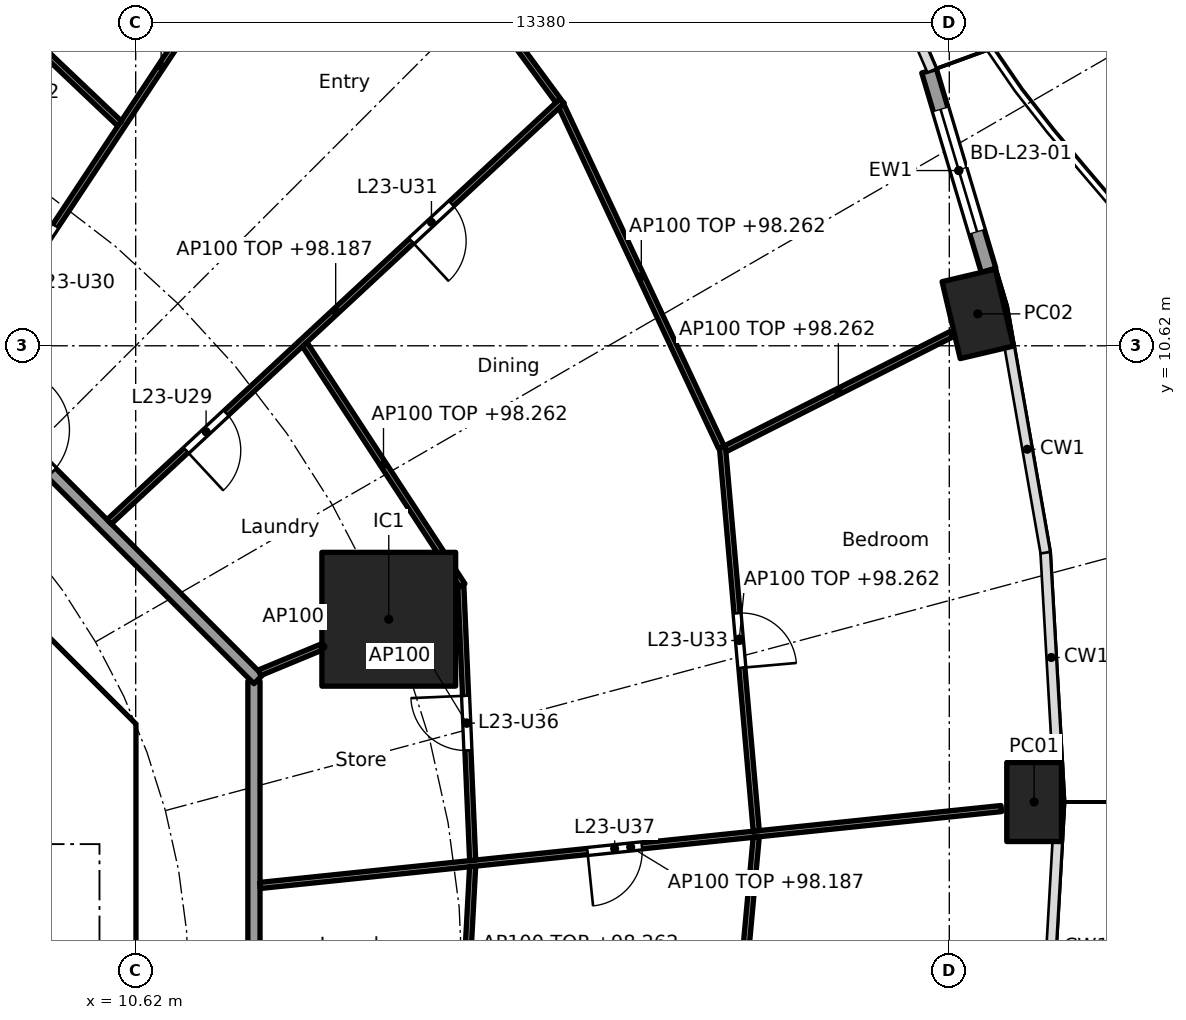
"""IFC4 building model, lengths in metres.
Left out: names, types, materials, properties, quantities, classifications, styles, units other than length and angle.
Written with IfcOpenShell. Run it as: python <this file> out.ifc"""

import sys

from ifc_helpers import new_model, si_unit, direction, frame, frame_2d, origin, origin_2d, place, context, subcontext, project, spatial, polyline, rectangle, hollow_rectangle, outline, extrude, element, fill, save


model = new_model("IFC4")
c1 = context("Model", 3, precision=1e-05, world=origin(), true_north=direction((0.0, 1.0)))
c2 = subcontext(c1, "Body", "Model", "MODEL_VIEW")
j1 = project(units=[si_unit("LENGTHUNIT", "METRE"), si_unit("PLANEANGLEUNIT", "RADIAN")], contexts=[c1])
p1 = place(None, origin())
s1 = spatial("IfcSite", under=j1, at=p1, CompositionType="ELEMENT")
p2 = place(p1, origin())
s2 = spatial("IfcBuilding", under=s1, at=p2, CompositionType="ELEMENT")
p3 = place(p2, frame((0.0, 0.0, 95.5)))
s3 = spatial("IfcBuildingStorey", under=s2, at=p3, CompositionType="ELEMENT", Elevation=95.5)
for number, where, z_axis, x_axis in (
    (1, (25.395, 3.118, 0.0), (0.0, 0.0, 1.0), (0.0, 1.0, 0.0)),
    (2, (24.468, 11.145, 0.0), (0.0, 0.0, 1.0), (-0.229, 0.973, 0.0)),
):
    element("IfcColumn", number, at=place(p3, frame(where, z_axis=z_axis, x_axis=x_axis)), inside=s3, PredefinedType="COLUMN", context=c2, shape_type="SweptSolid", body=[
        extrude(hollow_rectangle(XDim=1.3, YDim=0.9, WallThickness=0.045, at=origin_2d()), origin(), (0.0, 0.0, 1.0), 3.7),
    ])
p4 = place(p3, frame((14.782, 6.123, 0.0), z_axis=(0.0, 0.0, 1.0), x_axis=(1.0, 0.0, 0.0)))
e3 = element("IfcColumn", 3, at=p4, inside=s3, PredefinedType="COLUMN", context=c2, shape_type="SweptSolid", body=[
    extrude(rectangle(XDim=2.2, YDim=2.2, at=origin_2d()), origin(), (0.0, 0.0, 1.0), 3.7),
])
p5 = place(p3, frame((23.667, 15.142, 0.0), z_axis=(0.0, 0.0, 1.0), x_axis=(0.285882094477, -0.958264800594, 0.0)))
e4 = element("IfcWall", 4, at=p5, inside=s3, PredefinedType="SOLIDWALL", context=c2, shape_type="SweptSolid", body=[
    extrude(rectangle(XDim=3.424, YDim=0.25, at=frame_2d((1.712, 0.0))), origin(), (0.0, 0.0, 1.0), 3.44),
])
p6 = place(p5, frame((0.662, 0.0, 0.0)))
e5 = element("IfcOpeningElement", 5, at=p6, cuts=e4, PredefinedType="OPENING", context=c2, shape_type="SweptSolid", body=[
    extrude(rectangle(XDim=2.1, YDim=2.4, at=frame_2d((1.05, 1.2))), frame((0.0, 0.135, 0.0), z_axis=(0.0, -1.0, 0.0), x_axis=(1.0, 0.0, 0.0)), (0.0, 0.0, 1.0), 0.27),
])
p7 = place(p3, frame((9.988, 4.613, 0.0), z_axis=(0.0, 0.0, 1.0), x_axis=(-0.707106781187, 0.707106781187, 0.0)))
e6 = element("IfcWall", 6, at=p7, inside=s3, PredefinedType="SHEAR", context=c2, shape_type="SweptSolid", body=[
    extrude(rectangle(XDim=7.602, YDim=0.6, at=frame_2d((3.801, 0.0))), origin(), (0.0, 0.0, 1.0), 3.44),
])
p8 = place(p7, frame((3.201, 0.0, 0.0)))
e7 = element("IfcOpeningElement", 7, at=p8, cuts=e6, PredefinedType="OPENING", context=c2, shape_type="SweptSolid", body=[
    extrude(rectangle(XDim=1.2, YDim=2.1, at=frame_2d((0.6, 1.05))), frame((0.0, 0.31, 0.0), z_axis=(0.0, -1.0, 0.0), x_axis=(1.0, 0.0, 0.0)), (0.0, 0.0, 1.0), 0.62),
])
p9 = place(p3, frame((6.7, 4.0, 0.0), z_axis=(0.0, 0.0, 1.0), x_axis=(1.0, 0.0, 0.0)))
e8 = element("IfcWall", 8, at=p9, inside=s3, PredefinedType="SOLIDWALL", context=c2, shape_type="SweptSolid", body=[
    extrude(rectangle(XDim=3.325, YDim=0.2, at=frame_2d((1.662, 0.0))), origin(), (0.0, 0.0, 1.0), 3.44),
])
p10 = place(p9, frame((1.25, 0.0, 0.0)))
e9 = element("IfcOpeningElement", 9, at=p10, cuts=e8, PredefinedType="OPENING", context=c2, shape_type="SweptSolid", body=[
    extrude(rectangle(XDim=1.1, YDim=2.1, at=frame_2d((0.55, 1.05))), frame((0.0, 0.11, 0.0), z_axis=(0.0, -1.0, 0.0), x_axis=(1.0, 0.0, 0.0)), (0.0, 0.0, 1.0), 0.22),
])
p11 = place(p3, origin())
e10 = element("IfcWall", 10, at=p11, inside=s3, PredefinedType="SHEAR", context=c2, shape_type="SweptSolid", body=[
    extrude(outline(polyline([(9.776, -4.401), (10.025, -4.152), (10.025, -3.801), (10.025, 4.152), (9.776, 4.401), (10.2, 4.825), (10.625, 4.401), (10.625, -4.401), (10.2, -4.825), (9.776, -4.401)])), origin(), (0.0, 0.0, 1.0), 3.44),
])
p12 = place(p3, frame((6.141, 14.829, 0.0), z_axis=(0.0, 0.0, 1.0), x_axis=(0.354477134193, 0.935064682968, 0.0)))
e11 = element("IfcWall", 11, at=p12, inside=s3, PredefinedType="PARTITIONING", context=c2, shape_type="SweptSolid", body=[
    extrude(rectangle(XDim=15.626, YDim=0.2, at=frame_2d((7.813, 0.0))), origin(), (0.0, 0.0, 1.0), 2.762),
])
p13 = place(p3, frame((12.565, -5.104, 0.0), z_axis=(0.0, 0.0, 1.0), x_axis=(0.0, 1.0, 0.0)))
e12 = element("IfcWall", 12, at=p13, inside=s3, PredefinedType="PARTITIONING", context=c2, shape_type="SweptSolid", body=[
    extrude(rectangle(XDim=10.209, YDim=0.2, at=frame_2d((5.104, 0.0))), origin(), (0.0, 0.0, 1.0), 3.44),
])
p14 = place(p3, frame((12.635, 5.134, 0.0), z_axis=(0.0, 0.0, 1.0), x_axis=(-0.707106781187, 0.707106781187, 0.0)))
e13 = element("IfcWall", 13, at=p14, inside=s3, PredefinedType="PARTITIONING", context=c2, shape_type="SweptSolid", body=[
    extrude(rectangle(XDim=10.609, YDim=0.2, at=frame_2d((5.305, 0.0))), origin(), (0.0, 0.0, 1.0), 3.44),
])
p15 = place(p14, frame((4.804, 0.0, 0.0)))
e14 = element("IfcOpeningElement", 14, at=p15, cuts=e13, PredefinedType="OPENING", context=c2, shape_type="SweptSolid", body=[
    extrude(rectangle(XDim=1.0, YDim=2.1, at=frame_2d((0.5, 1.05))), frame((0.0, 0.11, 0.0), z_axis=(0.0, -1.0, 0.0), x_axis=(1.0, 0.0, 0.0)), (0.0, 0.0, 1.0), 0.22),
])
p16 = place(p3, frame((12.664, 1.745, 0.0), z_axis=(0.0, 0.0, 1.0), x_axis=(0.994662790212, 0.103179134358, 0.0)))
e15 = element("IfcWall", 15, at=p16, inside=s3, PredefinedType="PARTITIONING", context=c2, shape_type="SweptSolid", body=[
    extrude(rectangle(XDim=12.257, YDim=0.1, at=frame_2d((6.128, 0.0))), origin(), (0.0, 0.0, 1.0), 2.687),
])
p17 = place(p16, frame((5.414, 0.0, 0.0)))
e16 = element("IfcOpeningElement", 16, at=p17, cuts=e15, PredefinedType="OPENING", context=c2, shape_type="SweptSolid", body=[
    extrude(rectangle(XDim=0.9, YDim=2.1, at=frame_2d((0.45, 1.05))), frame((0.0, 0.06, 0.0), z_axis=(0.0, -1.0, 0.0), x_axis=(1.0, 0.0, 0.0)), (0.0, 0.0, 1.0), 0.12),
])
p18 = place(p3, frame((16.162, 2.158, 0.0), z_axis=(0.0, 0.0, 1.0), x_axis=(-0.043120653248, 0.999069872063, 0.0)))
e17 = element("IfcWall", 17, at=p18, inside=s3, PredefinedType="PARTITIONING", context=c2, shape_type="SweptSolid", body=[
    extrude(rectangle(XDim=4.518, YDim=0.1, at=frame_2d((2.259, 0.0))), origin(), (0.0, 0.0, 1.0), 3.44),
])
p19 = place(p18, frame((1.809, 0.0, 0.0)))
e18 = element("IfcOpeningElement", 18, at=p19, cuts=e17, PredefinedType="OPENING", context=c2, shape_type="SweptSolid", body=[
    extrude(rectangle(XDim=0.9, YDim=2.1, at=frame_2d((0.45, 1.05))), frame((0.0, 0.06, 0.0), z_axis=(0.0, -1.0, 0.0), x_axis=(1.0, 0.0, 0.0)), (0.0, 0.0, 1.0), 0.12),
])
p20 = place(p3, frame((16.161, 2.058, 0.0), z_axis=(0.0, 0.0, 1.0), x_axis=(-0.053696394729, -0.998557307916, 0.0)))
e19 = element("IfcWall", 19, at=p20, inside=s3, PredefinedType="PARTITIONING", context=c2, shape_type="SweptSolid", body=[
    extrude(rectangle(XDim=4.742, YDim=0.1, at=frame_2d((2.371, 0.0))), origin(), (0.0, 0.0, 1.0), 2.762),
])
p21 = place(p20, frame((1.896, 0.0, 0.0)))
e20 = element("IfcOpeningElement", 20, at=p21, cuts=e19, PredefinedType="OPENING", context=c2, shape_type="SweptSolid", body=[
    extrude(rectangle(XDim=0.9, YDim=2.1, at=frame_2d((0.45, 1.05))), frame((0.0, 0.06, 0.0), z_axis=(0.0, -1.0, 0.0), x_axis=(1.0, 0.0, 0.0)), (0.0, 0.0, 1.0), 0.12),
])
p22 = place(p3, frame((20.825, 2.642, 0.0), z_axis=(0.0, 0.0, 1.0), x_axis=(-0.08776338161, 0.996141349834, 0.0)))
e21 = element("IfcWall", 21, at=p22, inside=s3, PredefinedType="PARTITIONING", context=c2, shape_type="SweptSolid", body=[
    extrude(rectangle(XDim=6.337, YDim=0.1, at=frame_2d((3.168, 0.0))), origin(), (0.0, 0.0, 1.0), 2.762),
])
p23 = place(p22, frame((2.694, 0.0, 0.0)))
e22 = element("IfcOpeningElement", 22, at=p23, cuts=e21, PredefinedType="OPENING", context=c2, shape_type="SweptSolid", body=[
    extrude(rectangle(XDim=0.9, YDim=2.1, at=frame_2d((0.45, 1.05))), frame((0.0, 0.06, 0.0), z_axis=(0.0, -1.0, 0.0), x_axis=(1.0, 0.0, 0.0)), (0.0, 0.0, 1.0), 0.12),
])
p24 = place(p3, frame((20.825, 2.542, 0.0), z_axis=(0.0, 0.0, 1.0), x_axis=(-0.09140211812, -0.995814065377, 0.0)))
e23 = element("IfcWall", 23, at=p24, inside=s3, PredefinedType="PARTITIONING", context=c2, shape_type="SweptSolid", body=[
    extrude(rectangle(XDim=6.403, YDim=0.1, at=frame_2d((3.201, 0.0))), origin(), (0.0, 0.0, 1.0), 2.762),
])
p25 = place(p24, frame((2.726, 0.0, 0.0)))
e24 = element("IfcOpeningElement", 24, at=p25, cuts=e23, PredefinedType="OPENING", context=c2, shape_type="SweptSolid", body=[
    extrude(rectangle(XDim=0.9, YDim=2.1, at=frame_2d((0.45, 1.05))), frame((0.0, 0.06, 0.0), z_axis=(0.0, -1.0, 0.0), x_axis=(1.0, 0.0, 0.0)), (0.0, 0.0, 1.0), 0.12),
])
p26 = place(p3, frame((12.657, 5.243, 0.0), z_axis=(0.0, 0.0, 1.0), x_axis=(0.923864733477, 0.382719158442, 0.0)))
e25 = element("IfcWall", 25, at=p26, inside=s3, PredefinedType="PARTITIONING", context=c2, shape_type="SweptSolid", body=[
    extrude(rectangle(XDim=2.25, YDim=0.1, at=frame_2d((1.125, 0.0))), origin(), (0.0, 0.0, 1.0), 3.44),
])
p27 = place(p3, frame((15.992, 6.68, 0.0), z_axis=(0.0, 0.0, 1.0), x_axis=(-0.547472878942, 0.836823426311, 0.0)))
e26 = element("IfcWall", 26, at=p27, inside=s3, PredefinedType="PARTITIONING", context=c2, shape_type="SweptSolid", body=[
    extrude(rectangle(XDim=4.738, YDim=0.1, at=frame_2d((2.369, 0.0))), origin(), (0.0, 0.0, 1.0), 2.762),
])
p28 = place(p3, frame((20.318, 8.927, 0.0), z_axis=(0.0, 0.0, 1.0), x_axis=(0.892057836959, 0.451921249246, 0.0)))
e27 = element("IfcWall", 27, at=p28, inside=s3, PredefinedType="PARTITIONING", context=c2, shape_type="SweptSolid", body=[
    extrude(rectangle(XDim=4.164, YDim=0.1, at=frame_2d((2.082, 0.0))), origin(), (0.0, 0.0, 1.0), 2.762),
])
p29 = place(p3, frame((20.252, 8.95, 0.0), z_axis=(0.0, 0.0, 1.0), x_axis=(-0.424580052627, 0.90539040138, 0.0)))
e28 = element("IfcWall", 28, at=p29, inside=s3, PredefinedType="PARTITIONING", context=c2, shape_type="SweptSolid", body=[
    extrude(rectangle(XDim=6.204, YDim=0.1, at=frame_2d((3.102, 0.0))), origin(), (0.0, 0.0, 1.0), 2.762),
])
p30 = place(p3, frame((10.185, 7.726, 0.0), z_axis=(0.0, 0.0, 1.0), x_axis=(0.732598472978, 0.680661059112, 0.0)))
e29 = element("IfcWall", 29, at=p30, inside=s3, PredefinedType="PARTITIONING", context=c2, shape_type="SweptSolid", body=[
    extrude(rectangle(XDim=10.167, YDim=0.1, at=frame_2d((5.084, 0.0))), origin(), (0.0, 0.0, 1.0), 2.687),
])
p31 = place(p30, frame((1.725, 0.0, 0.0)))
e30 = element("IfcOpeningElement", 30, at=p31, cuts=e29, PredefinedType="OPENING", context=c2, shape_type="SweptSolid", body=[
    extrude(rectangle(XDim=0.9, YDim=2.1, at=frame_2d((0.45, 1.05))), frame((0.0, 0.06, 0.0), z_axis=(0.0, -1.0, 0.0), x_axis=(1.0, 0.0, 0.0)), (0.0, 0.0, 1.0), 0.12),
])
p32 = place(p30, frame((6.784, 0.0, 0.0)))
e31 = element("IfcOpeningElement", 31, at=p32, cuts=e29, PredefinedType="OPENING", context=c2, shape_type="SweptSolid", body=[
    extrude(rectangle(XDim=0.9, YDim=2.1, at=frame_2d((0.45, 1.05))), frame((0.0, 0.06, 0.0), z_axis=(0.0, -1.0, 0.0), x_axis=(1.0, 0.0, 0.0)), (0.0, 0.0, 1.0), 0.12),
])
p33 = place(p3, frame((17.567, 14.653, 0.0), z_axis=(0.0, 0.0, 1.0), x_axis=(-0.592391983588, 0.80564988536, 0.0)))
e32 = element("IfcWall", 32, at=p33, inside=s3, PredefinedType="PARTITIONING", context=c2, shape_type="SweptSolid", body=[
    extrude(rectangle(XDim=6.08, YDim=0.1, at=frame_2d((3.04, 0.0))), origin(), (0.0, 0.0, 1.0), 2.762),
])
p34 = place(p33, frame((2.59, 0.0, 0.0)))
e33 = element("IfcOpeningElement", 33, at=p34, cuts=e32, PredefinedType="OPENING", context=c2, shape_type="SweptSolid", body=[
    extrude(rectangle(XDim=0.9, YDim=2.1, at=frame_2d((0.45, 1.05))), frame((0.0, 0.06, 0.0), z_axis=(0.0, -1.0, 0.0), x_axis=(1.0, 0.0, 0.0)), (0.0, 0.0, 1.0), 0.12),
])
p35 = place(p3, frame((7.713, 10.195, 0.0), z_axis=(0.0, 0.0, 1.0), x_axis=(0.552111071171, 0.833770571015, 0.0)))
e34 = element("IfcWall", 34, at=p35, inside=s3, PredefinedType="PARTITIONING", context=c2, shape_type="SweptSolid", body=[
    extrude(rectangle(XDim=17.208, YDim=0.1, at=frame_2d((8.604, 0.0))), origin(), (0.0, 0.0, 1.0), 2.687),
])
p36 = place(p35, frame((1.976, 0.0, 0.0)))
e35 = element("IfcOpeningElement", 35, at=p36, cuts=e34, PredefinedType="OPENING", context=c2, shape_type="SweptSolid", body=[
    extrude(rectangle(XDim=0.9, YDim=2.1, at=frame_2d((0.45, 1.05))), frame((0.0, 0.06, 0.0), z_axis=(0.0, -1.0, 0.0), x_axis=(1.0, 0.0, 0.0)), (0.0, 0.0, 1.0), 0.12),
])
p37 = place(p35, frame((7.611, 0.0, 0.0)))
e36 = element("IfcOpeningElement", 36, at=p37, cuts=e34, PredefinedType="OPENING", context=c2, shape_type="SweptSolid", body=[
    extrude(rectangle(XDim=0.9, YDim=2.1, at=frame_2d((0.45, 1.05))), frame((0.0, 0.06, 0.0), z_axis=(0.0, -1.0, 0.0), x_axis=(1.0, 0.0, 0.0)), (0.0, 0.0, 1.0), 0.12),
])
p38 = place(p35, frame((13.79, 0.0, 0.0)))
e37 = element("IfcOpeningElement", 37, at=p38, cuts=e34, PredefinedType="OPENING", context=c2, shape_type="SweptSolid", body=[
    extrude(rectangle(XDim=0.9, YDim=2.1, at=frame_2d((0.45, 1.05))), frame((0.0, 0.06, 0.0), z_axis=(0.0, -1.0, 0.0), x_axis=(1.0, 0.0, 0.0)), (0.0, 0.0, 1.0), 0.12),
])
p39 = place(p3, frame((10.355, 14.274, 0.0), z_axis=(0.0, 0.0, 1.0), x_axis=(-0.725206433622, 0.688531501555, 0.0)))
e38 = element("IfcWall", 38, at=p39, inside=s3, PredefinedType="PARTITIONING", context=c2, shape_type="SweptSolid", body=[
    extrude(rectangle(XDim=4.387, YDim=0.1, at=frame_2d((2.193, 0.0))), origin(), (0.0, 0.0, 1.0), 2.762),
])
p40 = place(p6, origin())
e39 = element("IfcDoor", 39, at=p40, inside=s3, OperationType="SLIDING_TO_LEFT", PredefinedType="DOOR", context=c2, shape_type="SweptSolid", body=[
    extrude(rectangle(XDim=2.1, YDim=2.4, at=frame_2d((1.05, 1.2))), frame((0.0, 0.025, 0.0), z_axis=(0.0, -1.0, 0.0), x_axis=(1.0, 0.0, 0.0)), (0.0, 0.0, 1.0), 0.05),
])
fill(e5, e39)
p41 = place(p15, frame((1.0, 0.0, 0.0), x_axis=(-1.0, 0.0, 0.0)))
e40 = element("IfcDoor", 40, at=p41, inside=s3, OperationType="SINGLE_SWING_LEFT", PredefinedType="DOOR", context=c2, shape_type="SweptSolid", body=[
    extrude(rectangle(XDim=1.0, YDim=2.1, at=frame_2d((0.5, 1.05))), frame((0.0, 0.025, 0.0), z_axis=(0.0, -1.0, 0.0), x_axis=(1.0, 0.0, 0.0)), (0.0, 0.0, 1.0), 0.05),
])
fill(e14, e40)
p42 = place(p31, frame((0.9, 0.0, 0.0), x_axis=(-1.0, 0.0, 0.0)))
e41 = element("IfcDoor", 41, at=p42, inside=s3, OperationType="SINGLE_SWING_RIGHT", PredefinedType="DOOR", context=c2, shape_type="SweptSolid", body=[
    extrude(rectangle(XDim=0.9, YDim=2.1, at=frame_2d((0.45, 1.05))), frame((0.0, 0.025, 0.0), z_axis=(0.0, -1.0, 0.0), x_axis=(1.0, 0.0, 0.0)), (0.0, 0.0, 1.0), 0.05),
])
fill(e30, e41)
p43 = place(p36, origin())
e42 = element("IfcDoor", 42, at=p43, inside=s3, OperationType="SINGLE_SWING_RIGHT", PredefinedType="DOOR", context=c2, shape_type="SweptSolid", body=[
    extrude(rectangle(XDim=0.9, YDim=2.1, at=frame_2d((0.45, 1.05))), frame((0.0, 0.025, 0.0), z_axis=(0.0, -1.0, 0.0), x_axis=(1.0, 0.0, 0.0)), (0.0, 0.0, 1.0), 0.05),
])
fill(e35, e42)
p44 = place(p32, frame((0.9, 0.0, 0.0), x_axis=(-1.0, 0.0, 0.0)))
e43 = element("IfcDoor", 43, at=p44, inside=s3, OperationType="SINGLE_SWING_RIGHT", PredefinedType="DOOR", context=c2, shape_type="SweptSolid", body=[
    extrude(rectangle(XDim=0.9, YDim=2.1, at=frame_2d((0.45, 1.05))), frame((0.0, 0.025, 0.0), z_axis=(0.0, -1.0, 0.0), x_axis=(1.0, 0.0, 0.0)), (0.0, 0.0, 1.0), 0.05),
])
fill(e31, e43)
p45 = place(p23, frame((0.9, 0.0, 0.0), x_axis=(-1.0, 0.0, 0.0)))
e44 = element("IfcDoor", 44, at=p45, inside=s3, OperationType="SINGLE_SWING_RIGHT", PredefinedType="DOOR", context=c2, shape_type="SweptSolid", body=[
    extrude(rectangle(XDim=0.9, YDim=2.1, at=frame_2d((0.45, 1.05))), frame((0.0, 0.025, 0.0), z_axis=(0.0, -1.0, 0.0), x_axis=(1.0, 0.0, 0.0)), (0.0, 0.0, 1.0), 0.05),
])
fill(e22, e44)
p46 = place(p19, origin())
e45 = element("IfcDoor", 45, at=p46, inside=s3, OperationType="SINGLE_SWING_RIGHT", PredefinedType="DOOR", context=c2, shape_type="SweptSolid", body=[
    extrude(rectangle(XDim=0.9, YDim=2.1, at=frame_2d((0.45, 1.05))), frame((0.0, 0.025, 0.0), z_axis=(0.0, -1.0, 0.0), x_axis=(1.0, 0.0, 0.0)), (0.0, 0.0, 1.0), 0.05),
])
fill(e18, e45)
p47 = place(p17, frame((0.9, 0.0, 0.0), x_axis=(-1.0, 0.0, 0.0)))
e46 = element("IfcDoor", 46, at=p47, inside=s3, OperationType="SINGLE_SWING_RIGHT", PredefinedType="DOOR", context=c2, shape_type="SweptSolid", body=[
    extrude(rectangle(XDim=0.9, YDim=2.1, at=frame_2d((0.45, 1.05))), frame((0.0, 0.025, 0.0), z_axis=(0.0, -1.0, 0.0), x_axis=(1.0, 0.0, 0.0)), (0.0, 0.0, 1.0), 0.05),
])
fill(e16, e46)
save(model, sys.argv[1])
